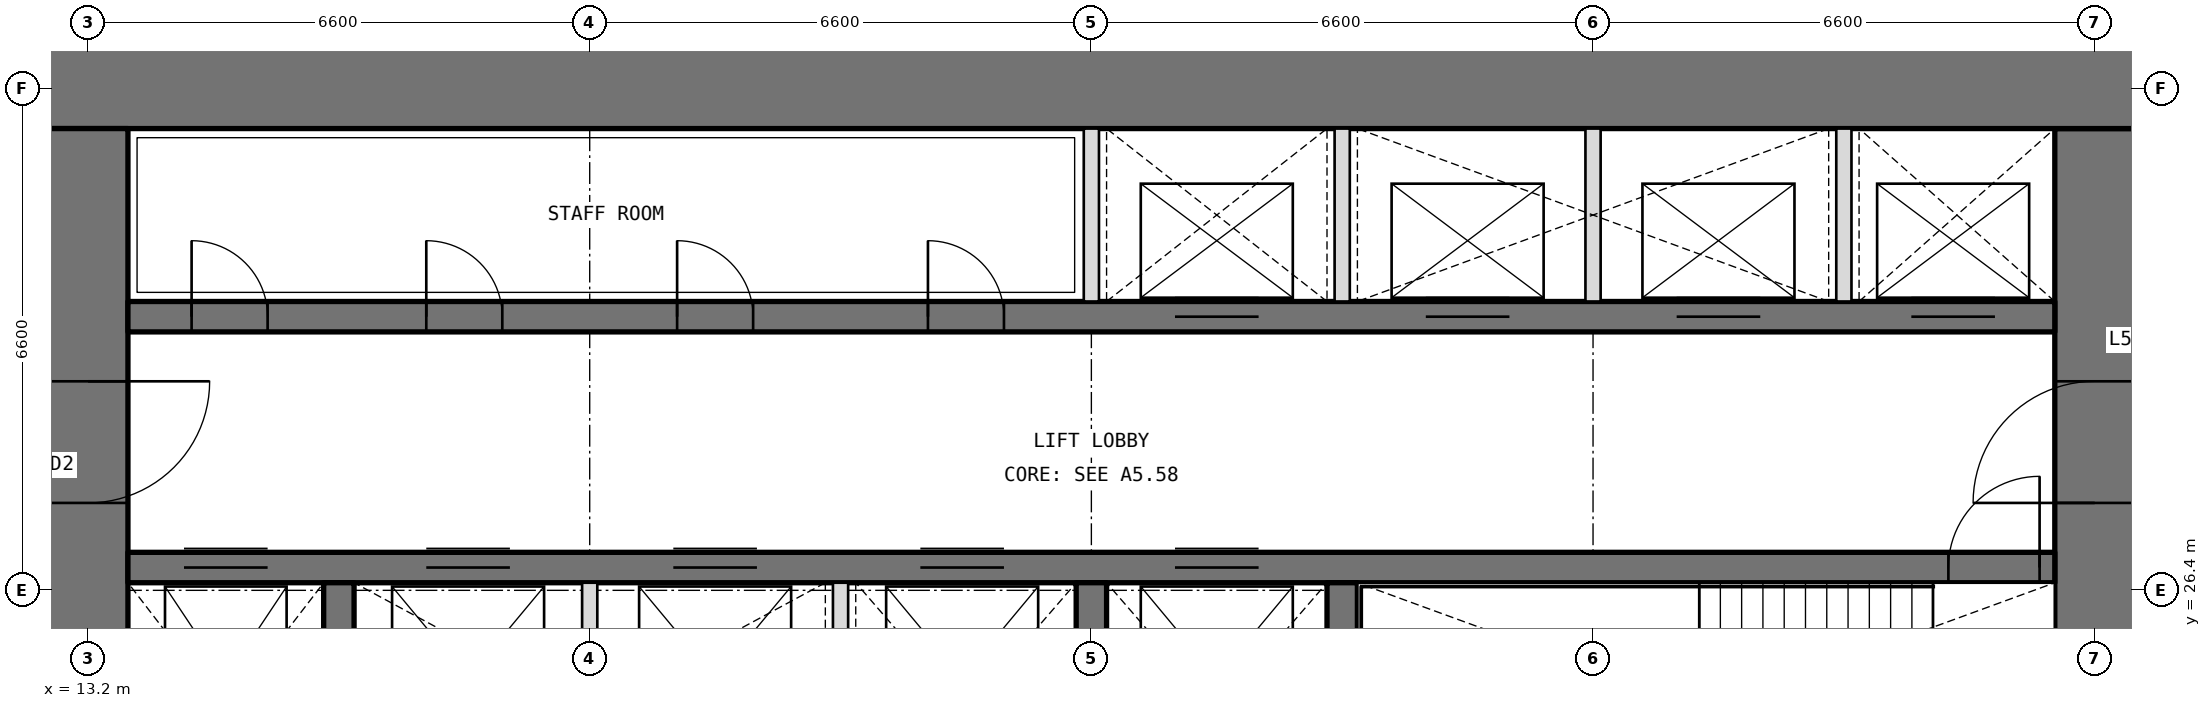
"""IFC4 building model, lengths in metres.
Left out: names, types, materials, properties, quantities, classifications, styles, units other than length and angle.
Written with IfcOpenShell. Run it as: python <this file> out.ifc"""

import sys

from ifc_helpers import new_model, si_unit, direction, frame, frame_2d, origin, place, context, subcontext, project, spatial, rectangle, extrude, element, fill, save


model = new_model("IFC4")
c1 = context("Model", 3, precision=1e-05, world=origin(), true_north=direction((0.0, 1.0)))
c2 = subcontext(c1, "Body", "Model", "MODEL_VIEW")
j1 = project(units=[si_unit("LENGTHUNIT", "METRE"), si_unit("PLANEANGLEUNIT", "RADIAN")], contexts=[c1])
p1 = place(None, origin())
s1 = spatial("IfcSite", under=j1, at=p1, CompositionType="ELEMENT")
p2 = place(p1, origin())
s2 = spatial("IfcBuilding", under=s1, at=p2, CompositionType="ELEMENT")
p3 = place(p2, frame((0.0, 0.0, 246.0)))
s3 = spatial("IfcBuildingStorey", under=s2, at=p3, CompositionType="ELEMENT", Elevation=246.0)
p4 = place(p3, frame((39.6, 13.725, 0.0), z_axis=(0.0, 0.0, 1.0), x_axis=(0.0, 1.0, 0.0)))
e1 = element("IfcWall", 1, at=p4, inside=s3, PredefinedType="SHEAR", context=c2, shape_type="SweptSolid", body=[
    extrude(rectangle(XDim=18.75, YDim=1.05, at=frame_2d((9.375, 0.0))), origin(), (0.0, 0.0, 1.0), 4.2),
])
p5 = place(p4, frame((3.025, 0.0, 0.0)))
e2 = element("IfcOpeningElement", 2, at=p5, cuts=e1, PredefinedType="OPENING", context=c2, shape_type="SweptSolid", body=[
    extrude(rectangle(XDim=1.6, YDim=2.1, at=frame_2d((0.8, 1.05))), frame((0.0, 0.535, 0.0), z_axis=(0.0, -1.0, 0.0), x_axis=(1.0, 0.0, 0.0)), (0.0, 0.0, 1.0), 1.07),
])
p6 = place(p4, frame((13.825, 0.0, 0.0)))
e3 = element("IfcOpeningElement", 3, at=p6, cuts=e1, PredefinedType="OPENING", context=c2, shape_type="SweptSolid", body=[
    extrude(rectangle(XDim=1.6, YDim=2.1, at=frame_2d((0.8, 1.05))), frame((0.0, 0.535, 0.0), z_axis=(0.0, -1.0, 0.0), x_axis=(1.0, 0.0, 0.0)), (0.0, 0.0, 1.0), 1.07),
])
p7 = place(p3, frame((40.125, 33.0, 0.0), z_axis=(0.0, 0.0, 1.0), x_axis=(-1.0, 0.0, 0.0)))
e4 = element("IfcWall", 4, at=p7, inside=s3, PredefinedType="SHEAR", context=c2, shape_type="SweptSolid", body=[
    extrude(rectangle(XDim=27.45, YDim=1.05, at=frame_2d((13.725, 0.0))), origin(), (0.0, 0.0, 1.0), 4.2),
])
p8 = place(p3, frame((13.2, 32.475, 0.0), z_axis=(0.0, 0.0, 1.0), x_axis=(0.0, -1.0, 0.0)))
e5 = element("IfcWall", 5, at=p8, inside=s3, PredefinedType="SHEAR", context=c2, shape_type="SweptSolid", body=[
    extrude(rectangle(XDim=18.75, YDim=1.05, at=frame_2d((9.375, 0.0))), origin(), (0.0, 0.0, 1.0), 4.2),
])
p9 = place(p8, frame((14.125, 0.0, 0.0)))
e6 = element("IfcOpeningElement", 6, at=p9, cuts=e5, PredefinedType="OPENING", context=c2, shape_type="SweptSolid", body=[
    extrude(rectangle(XDim=1.6, YDim=2.1, at=frame_2d((0.8, 1.05))), frame((0.0, 0.535, 0.0), z_axis=(0.0, -1.0, 0.0), x_axis=(1.0, 0.0, 0.0)), (0.0, 0.0, 1.0), 1.07),
])
p10 = place(p8, frame((3.325, 0.0, 0.0)))
e7 = element("IfcOpeningElement", 7, at=p10, cuts=e5, PredefinedType="OPENING", context=c2, shape_type="SweptSolid", body=[
    extrude(rectangle(XDim=1.6, YDim=2.1, at=frame_2d((0.8, 1.05))), frame((0.0, 0.535, 0.0), z_axis=(0.0, -1.0, 0.0), x_axis=(1.0, 0.0, 0.0)), (0.0, 0.0, 1.0), 1.07),
])
p11 = place(p3, frame((13.725, 26.7, 0.0), z_axis=(0.0, 0.0, 1.0), x_axis=(1.0, 0.0, 0.0)))
e8 = element("IfcWall", 8, at=p11, inside=s3, PredefinedType="SHEAR", context=c2, shape_type="SweptSolid", body=[
    extrude(rectangle(XDim=25.35, YDim=0.4, at=frame_2d((12.675, 0.0))), origin(), (0.0, 0.0, 1.0), 4.2),
])
p12 = place(p11, frame((23.95, 0.0, 0.0)))
e9 = element("IfcOpeningElement", 9, at=p12, cuts=e8, PredefinedType="OPENING", context=c2, shape_type="SweptSolid", body=[
    extrude(rectangle(XDim=1.2, YDim=2.1, at=frame_2d((0.6, 1.05))), frame((0.0, 0.21, 0.0), z_axis=(0.0, -1.0, 0.0), x_axis=(1.0, 0.0, 0.0)), (0.0, 0.0, 1.0), 0.42),
])
p13 = place(p11, frame((0.738, 0.0, 0.0)))
e10 = element("IfcOpeningElement", 10, at=p13, cuts=e8, PredefinedType="OPENING", context=c2, shape_type="SweptSolid", body=[
    extrude(rectangle(XDim=1.1, YDim=2.1, at=frame_2d((0.55, 1.05))), frame((0.0, 0.21, 0.0), z_axis=(0.0, -1.0, 0.0), x_axis=(1.0, 0.0, 0.0)), (0.0, 0.0, 1.0), 0.42),
])
p14 = place(p11, frame((3.925, 0.0, 0.0)))
e11 = element("IfcOpeningElement", 11, at=p14, cuts=e8, PredefinedType="OPENING", context=c2, shape_type="SweptSolid", body=[
    extrude(rectangle(XDim=1.1, YDim=2.1, at=frame_2d((0.55, 1.05))), frame((0.0, 0.21, 0.0), z_axis=(0.0, -1.0, 0.0), x_axis=(1.0, 0.0, 0.0)), (0.0, 0.0, 1.0), 0.42),
])
p15 = place(p11, frame((7.175, 0.0, 0.0)))
e12 = element("IfcOpeningElement", 12, at=p15, cuts=e8, PredefinedType="OPENING", context=c2, shape_type="SweptSolid", body=[
    extrude(rectangle(XDim=1.1, YDim=2.1, at=frame_2d((0.55, 1.05))), frame((0.0, 0.21, 0.0), z_axis=(0.0, -1.0, 0.0), x_axis=(1.0, 0.0, 0.0)), (0.0, 0.0, 1.0), 0.42),
])
p16 = place(p11, frame((10.425, 0.0, 0.0)))
e13 = element("IfcOpeningElement", 13, at=p16, cuts=e8, PredefinedType="OPENING", context=c2, shape_type="SweptSolid", body=[
    extrude(rectangle(XDim=1.1, YDim=2.1, at=frame_2d((0.55, 1.05))), frame((0.0, 0.21, 0.0), z_axis=(0.0, -1.0, 0.0), x_axis=(1.0, 0.0, 0.0)), (0.0, 0.0, 1.0), 0.42),
])
p17 = place(p11, frame((13.775, 0.0, 0.0)))
e14 = element("IfcOpeningElement", 14, at=p17, cuts=e8, PredefinedType="OPENING", context=c2, shape_type="SweptSolid", body=[
    extrude(rectangle(XDim=1.1, YDim=2.1, at=frame_2d((0.55, 1.05))), frame((0.0, 0.21, 0.0), z_axis=(0.0, -1.0, 0.0), x_axis=(1.0, 0.0, 0.0)), (0.0, 0.0, 1.0), 0.42),
])
p18 = place(p3, frame((13.725, 30.0, 0.0), z_axis=(0.0, 0.0, 1.0), x_axis=(1.0, 0.0, 0.0)))
e15 = element("IfcWall", 15, at=p18, inside=s3, PredefinedType="SHEAR", context=c2, shape_type="SweptSolid", body=[
    extrude(rectangle(XDim=25.35, YDim=0.4, at=frame_2d((12.675, 0.0))), origin(), (0.0, 0.0, 1.0), 4.2),
])
p19 = place(p18, frame((0.837, 0.0, 0.0)))
e16 = element("IfcOpeningElement", 16, at=p19, cuts=e15, PredefinedType="OPENING", context=c2, shape_type="SweptSolid", body=[
    extrude(rectangle(XDim=1.0, YDim=2.1, at=frame_2d((0.5, 1.05))), frame((0.0, 0.21, 0.0), z_axis=(0.0, -1.0, 0.0), x_axis=(1.0, 0.0, 0.0)), (0.0, 0.0, 1.0), 0.42),
])
p20 = place(p18, frame((3.925, 0.0, 0.0)))
e17 = element("IfcOpeningElement", 17, at=p20, cuts=e15, PredefinedType="OPENING", context=c2, shape_type="SweptSolid", body=[
    extrude(rectangle(XDim=1.0, YDim=2.1, at=frame_2d((0.5, 1.05))), frame((0.0, 0.21, 0.0), z_axis=(0.0, -1.0, 0.0), x_axis=(1.0, 0.0, 0.0)), (0.0, 0.0, 1.0), 0.42),
])
p21 = place(p18, frame((7.225, 0.0, 0.0)))
e18 = element("IfcOpeningElement", 18, at=p21, cuts=e15, PredefinedType="OPENING", context=c2, shape_type="SweptSolid", body=[
    extrude(rectangle(XDim=1.0, YDim=2.1, at=frame_2d((0.5, 1.05))), frame((0.0, 0.21, 0.0), z_axis=(0.0, -1.0, 0.0), x_axis=(1.0, 0.0, 0.0)), (0.0, 0.0, 1.0), 0.42),
])
p22 = place(p18, frame((10.525, 0.0, 0.0)))
e19 = element("IfcOpeningElement", 19, at=p22, cuts=e15, PredefinedType="OPENING", context=c2, shape_type="SweptSolid", body=[
    extrude(rectangle(XDim=1.0, YDim=2.1, at=frame_2d((0.5, 1.05))), frame((0.0, 0.21, 0.0), z_axis=(0.0, -1.0, 0.0), x_axis=(1.0, 0.0, 0.0)), (0.0, 0.0, 1.0), 0.42),
])
p23 = place(p18, frame((13.775, 0.0, 0.0)))
e20 = element("IfcOpeningElement", 20, at=p23, cuts=e15, PredefinedType="OPENING", context=c2, shape_type="SweptSolid", body=[
    extrude(rectangle(XDim=1.1, YDim=2.1, at=frame_2d((0.55, 1.05))), frame((0.0, 0.21, 0.0), z_axis=(0.0, -1.0, 0.0), x_axis=(1.0, 0.0, 0.0)), (0.0, 0.0, 1.0), 0.42),
])
p24 = place(p18, frame((17.075, 0.0, 0.0)))
e21 = element("IfcOpeningElement", 21, at=p24, cuts=e15, PredefinedType="OPENING", context=c2, shape_type="SweptSolid", body=[
    extrude(rectangle(XDim=1.1, YDim=2.1, at=frame_2d((0.55, 1.05))), frame((0.0, 0.21, 0.0), z_axis=(0.0, -1.0, 0.0), x_axis=(1.0, 0.0, 0.0)), (0.0, 0.0, 1.0), 0.42),
])
p25 = place(p18, frame((20.375, 0.0, 0.0)))
e22 = element("IfcOpeningElement", 22, at=p25, cuts=e15, PredefinedType="OPENING", context=c2, shape_type="SweptSolid", body=[
    extrude(rectangle(XDim=1.1, YDim=2.1, at=frame_2d((0.55, 1.05))), frame((0.0, 0.21, 0.0), z_axis=(0.0, -1.0, 0.0), x_axis=(1.0, 0.0, 0.0)), (0.0, 0.0, 1.0), 0.42),
])
p26 = place(p18, frame((23.462, 0.0, 0.0)))
e23 = element("IfcOpeningElement", 23, at=p26, cuts=e15, PredefinedType="OPENING", context=c2, shape_type="SweptSolid", body=[
    extrude(rectangle(XDim=1.1, YDim=2.1, at=frame_2d((0.55, 1.05))), frame((0.0, 0.21, 0.0), z_axis=(0.0, -1.0, 0.0), x_axis=(1.0, 0.0, 0.0)), (0.0, 0.0, 1.0), 0.42),
])
for number, where, z_axis, x_axis in (
    (24, (16.5, 23.15, 0.0), (0.0, 0.0, 1.0), (0.0, 1.0, 0.0)),
    (25, (26.4, 23.15, 0.0), (0.0, 0.0, 1.0), (0.0, 1.0, 0.0)),
    (26, (29.7, 23.15, 0.0), (0.0, 0.0, 1.0), (0.0, 1.0, 0.0)),
):
    element("IfcWall", number, at=place(p3, frame(where, z_axis=z_axis, x_axis=x_axis)), inside=s3, PredefinedType="SHEAR", context=c2, shape_type="SweptSolid", body=[
        extrude(rectangle(XDim=3.35, YDim=0.4, at=frame_2d((1.675, 0.0))), origin(), (0.0, 0.0, 1.0), 4.2),
    ])
for number, where, z_axis, x_axis in (
    (27, (26.4, 30.2, 0.0), (0.0, 0.0, 1.0), (0.0, 1.0, 0.0)),
    (28, (29.7, 30.2, 0.0), (0.0, 0.0, 1.0), (0.0, 1.0, 0.0)),
    (29, (33.0, 30.2, 0.0), (0.0, 0.0, 1.0), (0.0, 1.0, 0.0)),
    (30, (36.3, 30.2, 0.0), (0.0, 0.0, 1.0), (0.0, 1.0, 0.0)),
):
    element("IfcWall", number, at=place(p3, frame(where, z_axis=z_axis, x_axis=x_axis)), inside=s3, PredefinedType="PARTITIONING", context=c2, shape_type="SweptSolid", body=[
        extrude(rectangle(XDim=2.275, YDim=0.2, at=frame_2d((1.138, 0.0))), origin(), (0.0, 0.0, 1.0), 4.2),
    ])
for number, where, z_axis, x_axis in (
    (31, (19.8, 23.15, 0.0), (0.0, 0.0, 1.0), (0.0, 1.0, 0.0)),
    (32, (23.1, 23.15, 0.0), (0.0, 0.0, 1.0), (0.0, 1.0, 0.0)),
):
    element("IfcWall", number, at=place(p3, frame(where, z_axis=z_axis, x_axis=x_axis)), inside=s3, PredefinedType="PARTITIONING", context=c2, shape_type="SweptSolid", body=[
        extrude(rectangle(XDim=3.35, YDim=0.2, at=frame_2d((1.675, 0.0))), origin(), (0.0, 0.0, 1.0), 4.2),
    ])
p27 = place(p19, origin())
e33 = element("IfcDoor", 33, at=p27, inside=s3, OperationType="SINGLE_SWING_LEFT", PredefinedType="DOOR", context=c2, shape_type="SweptSolid", body=[
    extrude(rectangle(XDim=1.0, YDim=2.1, at=frame_2d((0.5, 1.05))), frame((0.0, 0.025, 0.0), z_axis=(0.0, -1.0, 0.0), x_axis=(1.0, 0.0, 0.0)), (0.0, 0.0, 1.0), 0.05),
])
fill(e16, e33)
p28 = place(p20, origin())
e34 = element("IfcDoor", 34, at=p28, inside=s3, OperationType="SINGLE_SWING_LEFT", PredefinedType="DOOR", context=c2, shape_type="SweptSolid", body=[
    extrude(rectangle(XDim=1.0, YDim=2.1, at=frame_2d((0.5, 1.05))), frame((0.0, 0.025, 0.0), z_axis=(0.0, -1.0, 0.0), x_axis=(1.0, 0.0, 0.0)), (0.0, 0.0, 1.0), 0.05),
])
fill(e17, e34)
p29 = place(p21, origin())
e35 = element("IfcDoor", 35, at=p29, inside=s3, OperationType="SINGLE_SWING_LEFT", PredefinedType="DOOR", context=c2, shape_type="SweptSolid", body=[
    extrude(rectangle(XDim=1.0, YDim=2.1, at=frame_2d((0.5, 1.05))), frame((0.0, 0.025, 0.0), z_axis=(0.0, -1.0, 0.0), x_axis=(1.0, 0.0, 0.0)), (0.0, 0.0, 1.0), 0.05),
])
fill(e18, e35)
p30 = place(p22, origin())
e36 = element("IfcDoor", 36, at=p30, inside=s3, OperationType="SINGLE_SWING_LEFT", PredefinedType="DOOR", context=c2, shape_type="SweptSolid", body=[
    extrude(rectangle(XDim=1.0, YDim=2.1, at=frame_2d((0.5, 1.05))), frame((0.0, 0.025, 0.0), z_axis=(0.0, -1.0, 0.0), x_axis=(1.0, 0.0, 0.0)), (0.0, 0.0, 1.0), 0.05),
])
fill(e19, e36)
p31 = place(p12, origin())
e37 = element("IfcDoor", 37, at=p31, inside=s3, OperationType="SINGLE_SWING_RIGHT", PredefinedType="DOOR", context=c2, shape_type="SweptSolid", body=[
    extrude(rectangle(XDim=1.2, YDim=2.1, at=frame_2d((0.6, 1.05))), frame((0.0, 0.025, 0.0), z_axis=(0.0, -1.0, 0.0), x_axis=(1.0, 0.0, 0.0)), (0.0, 0.0, 1.0), 0.05),
])
fill(e9, e37)
p32 = place(p10, origin())
e38 = element("IfcDoor", 38, at=p32, inside=s3, OperationType="DOUBLE_DOOR_DOUBLE_SWING", PredefinedType="DOOR", context=c2, shape_type="SweptSolid", body=[
    extrude(rectangle(XDim=1.6, YDim=2.1, at=frame_2d((0.8, 1.05))), frame((0.0, 0.025, 0.0), z_axis=(0.0, -1.0, 0.0), x_axis=(1.0, 0.0, 0.0)), (0.0, 0.0, 1.0), 0.05),
])
fill(e7, e38)
p33 = place(p6, origin())
e39 = element("IfcDoor", 39, at=p33, inside=s3, OperationType="DOUBLE_DOOR_DOUBLE_SWING", PredefinedType="DOOR", context=c2, shape_type="SweptSolid", body=[
    extrude(rectangle(XDim=1.6, YDim=2.1, at=frame_2d((0.8, 1.05))), frame((0.0, 0.025, 0.0), z_axis=(0.0, -1.0, 0.0), x_axis=(1.0, 0.0, 0.0)), (0.0, 0.0, 1.0), 0.05),
])
fill(e3, e39)
p34 = place(p23, origin())
e40 = element("IfcDoor", 40, at=p34, inside=s3, OperationType="DOUBLE_DOOR_SLIDING", PredefinedType="DOOR", context=c2, shape_type="SweptSolid", body=[
    extrude(rectangle(XDim=1.1, YDim=2.1, at=frame_2d((0.55, 1.05))), frame((0.0, 0.025, 0.0), z_axis=(0.0, -1.0, 0.0), x_axis=(1.0, 0.0, 0.0)), (0.0, 0.0, 1.0), 0.05),
])
fill(e20, e40)
p35 = place(p24, origin())
e41 = element("IfcDoor", 41, at=p35, inside=s3, OperationType="DOUBLE_DOOR_SLIDING", PredefinedType="DOOR", context=c2, shape_type="SweptSolid", body=[
    extrude(rectangle(XDim=1.1, YDim=2.1, at=frame_2d((0.55, 1.05))), frame((0.0, 0.025, 0.0), z_axis=(0.0, -1.0, 0.0), x_axis=(1.0, 0.0, 0.0)), (0.0, 0.0, 1.0), 0.05),
])
fill(e21, e41)
p36 = place(p25, origin())
e42 = element("IfcDoor", 42, at=p36, inside=s3, OperationType="DOUBLE_DOOR_SLIDING", PredefinedType="DOOR", context=c2, shape_type="SweptSolid", body=[
    extrude(rectangle(XDim=1.1, YDim=2.1, at=frame_2d((0.55, 1.05))), frame((0.0, 0.025, 0.0), z_axis=(0.0, -1.0, 0.0), x_axis=(1.0, 0.0, 0.0)), (0.0, 0.0, 1.0), 0.05),
])
fill(e22, e42)
p37 = place(p26, origin())
e43 = element("IfcDoor", 43, at=p37, inside=s3, OperationType="DOUBLE_DOOR_SLIDING", PredefinedType="DOOR", context=c2, shape_type="SweptSolid", body=[
    extrude(rectangle(XDim=1.1, YDim=2.1, at=frame_2d((0.55, 1.05))), frame((0.0, 0.025, 0.0), z_axis=(0.0, -1.0, 0.0), x_axis=(1.0, 0.0, 0.0)), (0.0, 0.0, 1.0), 0.05),
])
fill(e23, e43)
p38 = place(p13, origin())
e44 = element("IfcDoor", 44, at=p38, inside=s3, OperationType="DOUBLE_DOOR_SLIDING", PredefinedType="DOOR", context=c2, shape_type="SweptSolid", body=[
    extrude(rectangle(XDim=1.1, YDim=2.1, at=frame_2d((0.55, 1.05))), frame((0.0, 0.025, 0.0), z_axis=(0.0, -1.0, 0.0), x_axis=(1.0, 0.0, 0.0)), (0.0, 0.0, 1.0), 0.05),
])
fill(e10, e44)
p39 = place(p14, origin())
e45 = element("IfcDoor", 45, at=p39, inside=s3, OperationType="DOUBLE_DOOR_SLIDING", PredefinedType="DOOR", context=c2, shape_type="SweptSolid", body=[
    extrude(rectangle(XDim=1.1, YDim=2.1, at=frame_2d((0.55, 1.05))), frame((0.0, 0.025, 0.0), z_axis=(0.0, -1.0, 0.0), x_axis=(1.0, 0.0, 0.0)), (0.0, 0.0, 1.0), 0.05),
])
fill(e11, e45)
p40 = place(p15, origin())
e46 = element("IfcDoor", 46, at=p40, inside=s3, OperationType="DOUBLE_DOOR_SLIDING", PredefinedType="DOOR", context=c2, shape_type="SweptSolid", body=[
    extrude(rectangle(XDim=1.1, YDim=2.1, at=frame_2d((0.55, 1.05))), frame((0.0, 0.025, 0.0), z_axis=(0.0, -1.0, 0.0), x_axis=(1.0, 0.0, 0.0)), (0.0, 0.0, 1.0), 0.05),
])
fill(e12, e46)
p41 = place(p16, origin())
e47 = element("IfcDoor", 47, at=p41, inside=s3, OperationType="DOUBLE_DOOR_SLIDING", PredefinedType="DOOR", context=c2, shape_type="SweptSolid", body=[
    extrude(rectangle(XDim=1.1, YDim=2.1, at=frame_2d((0.55, 1.05))), frame((0.0, 0.025, 0.0), z_axis=(0.0, -1.0, 0.0), x_axis=(1.0, 0.0, 0.0)), (0.0, 0.0, 1.0), 0.05),
])
fill(e13, e47)
p42 = place(p17, origin())
e48 = element("IfcDoor", 48, at=p42, inside=s3, OperationType="DOUBLE_DOOR_SLIDING", PredefinedType="DOOR", context=c2, shape_type="SweptSolid", body=[
    extrude(rectangle(XDim=1.1, YDim=2.1, at=frame_2d((0.55, 1.05))), frame((0.0, 0.025, 0.0), z_axis=(0.0, -1.0, 0.0), x_axis=(1.0, 0.0, 0.0)), (0.0, 0.0, 1.0), 0.05),
])
fill(e14, e48)
save(model, sys.argv[1])
